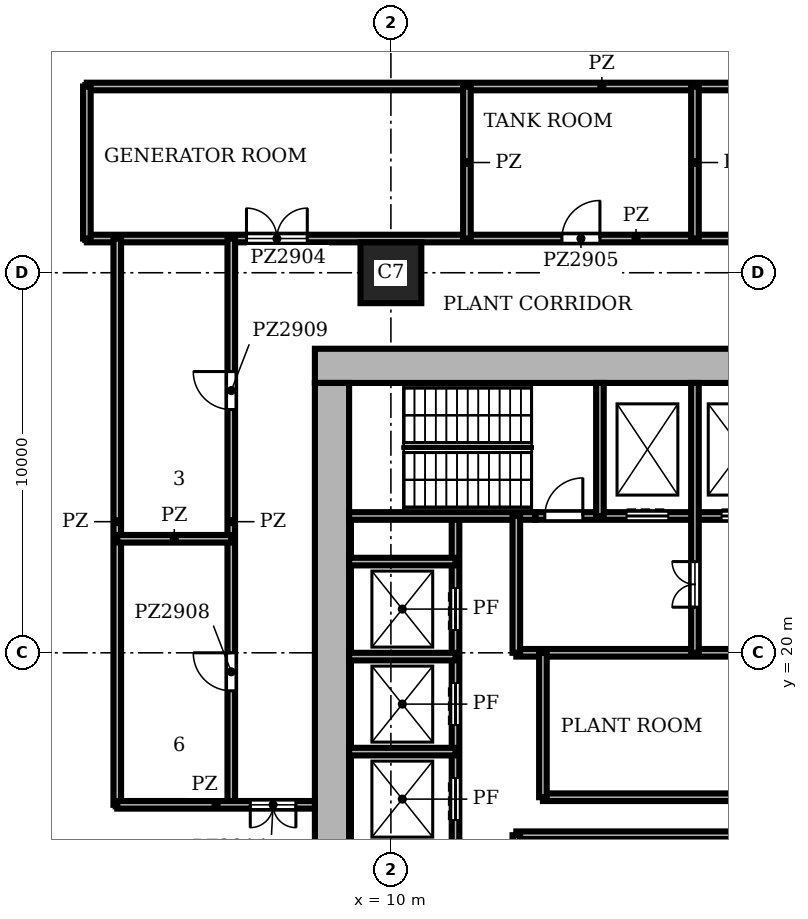
"""IFC4 building model, lengths in metres.
Left out: names, types, materials, properties, quantities, classifications, styles, units other than length and angle.
Written with IfcOpenShell. Run it as: python <this file> out.ifc"""

import sys

from ifc_helpers import new_model, si_unit, direction, frame, frame_2d, origin, origin_2d, place, context, subcontext, project, spatial, rectangle, extrude, element, fill, save


model = new_model("IFC4")
c1 = context("Model", 3, precision=1e-05, world=origin(), true_north=direction((0.0, 1.0)))
c2 = subcontext(c1, "Body", "Model", "MODEL_VIEW")
j1 = project(units=[si_unit("LENGTHUNIT", "METRE"), si_unit("PLANEANGLEUNIT", "RADIAN")], contexts=[c1])
p1 = place(None, origin())
s1 = spatial("IfcSite", under=j1, at=p1, CompositionType="ELEMENT")
p2 = place(p1, origin())
s2 = spatial("IfcBuilding", under=s1, at=p2, CompositionType="ELEMENT")
p3 = place(p2, frame((0.0, 0.0, 117.3)))
s3 = spatial("IfcBuildingStorey", under=s2, at=p3, CompositionType="ELEMENT", Elevation=117.3)
p4 = place(p3, frame((10.0, 30.0, 0.0), z_axis=(0.0, 0.0, 1.0), x_axis=(1.0, 0.0, 0.0)))
e1 = element("IfcColumn", 1, at=p4, inside=s3, PredefinedType="COLUMN", context=c2, shape_type="SweptSolid", body=[
    extrude(rectangle(XDim=1.6, YDim=1.6, at=origin_2d()), origin(), (0.0, 0.0, 1.0), 9.0),
])
p5 = place(p3, frame((28.0, 27.55, 0.0), z_axis=(0.0, 0.0, 1.0), x_axis=(-1.0, 0.0, 0.0)))
e2 = element("IfcWall", 2, at=p5, inside=s3, PredefinedType="SHEAR", context=c2, shape_type="SweptSolid", body=[
    extrude(rectangle(XDim=20.0, YDim=0.9, at=frame_2d((10.0, 0.0))), origin(), (0.0, 0.0, 1.0), 9.0),
])
p6 = place(p3, frame((8.45, 27.1, 0.0), z_axis=(0.0, 0.0, 1.0), x_axis=(0.0, -1.0, 0.0)))
e3 = element("IfcWall", 3, at=p6, inside=s3, PredefinedType="SHEAR", context=c2, shape_type="SweptSolid", body=[
    extrude(rectangle(XDim=18.2, YDim=0.9, at=frame_2d((9.1, 0.0))), origin(), (0.0, 0.0, 1.0), 9.0),
])
p7 = place(p3, frame((13.3, 15.2, 0.0), z_axis=(0.0, 0.0, 1.0), x_axis=(1.0, 0.0, 0.0)))
e4 = element("IfcWall", 4, at=p7, inside=s3, PredefinedType="SHEAR", context=c2, shape_type="SweptSolid", body=[
    extrude(rectangle(XDim=9.7, YDim=0.2, at=frame_2d((4.85, 0.0))), origin(), (0.0, 0.0, 1.0), 8.55),
])
p8 = place(p3, frame((14.0, 16.2, 0.0), z_axis=(0.0, 0.0, 1.0), x_axis=(1.0, 0.0, 0.0)))
e5 = element("IfcWall", 5, at=p8, inside=s3, PredefinedType="SHEAR", context=c2, shape_type="SweptSolid", body=[
    extrude(rectangle(XDim=8.0, YDim=0.2, at=frame_2d((4.0, 0.0))), origin(), (0.0, 0.0, 1.0), 8.55),
])
for number, where, z_axis, x_axis in (
    (6, (8.9, 17.4, 0.0), (0.0, 0.0, 1.0), (1.0, 0.0, 0.0)),
    (7, (8.9, 19.9, 0.0), (0.0, 0.0, 1.0), (1.0, 0.0, 0.0)),
):
    element("IfcWall", number, at=place(p3, frame(where, z_axis=z_axis, x_axis=x_axis)), inside=s3, PredefinedType="SHEAR", context=c2, shape_type="SweptSolid", body=[
        extrude(rectangle(XDim=2.8, YDim=0.2, at=frame_2d((1.4, 0.0))), origin(), (0.0, 0.0, 1.0), 8.55),
    ])
p9 = place(p3, frame((13.3, 20.0, 0.0), z_axis=(0.0, 0.0, 1.0), x_axis=(1.0, 0.0, 0.0)))
e8 = element("IfcWall", 8, at=p9, inside=s3, PredefinedType="SHEAR", context=c2, shape_type="SweptSolid", body=[
    extrude(rectangle(XDim=8.7, YDim=0.2, at=frame_2d((4.35, 0.0))), origin(), (0.0, 0.0, 1.0), 8.55),
])
p10 = place(p3, frame((8.9, 22.4, 0.0), z_axis=(0.0, 0.0, 1.0), x_axis=(1.0, 0.0, 0.0)))
e9 = element("IfcWall", 9, at=p10, inside=s3, PredefinedType="SHEAR", context=c2, shape_type="SweptSolid", body=[
    extrude(rectangle(XDim=2.8, YDim=0.2, at=frame_2d((1.4, 0.0))), origin(), (0.0, 0.0, 1.0), 8.55),
])
p11 = place(p3, frame((8.9, 23.6, 0.0), z_axis=(0.0, 0.0, 1.0), x_axis=(1.0, 0.0, 0.0)))
e10 = element("IfcWall", 10, at=p11, inside=s3, PredefinedType="SHEAR", context=c2, shape_type="SweptSolid", body=[
    extrude(rectangle(XDim=4.9, YDim=0.2, at=frame_2d((2.45, 0.0))), origin(), (0.0, 0.0, 1.0), 8.55),
])
p12 = place(p3, frame((13.8, 23.6, 0.0), z_axis=(0.0, 0.0, 1.0), x_axis=(1.0, 0.0, 0.0)))
e11 = element("IfcWall", 11, at=p12, inside=s3, PredefinedType="SHEAR", context=c2, shape_type="SweptSolid", body=[
    extrude(rectangle(XDim=13.3, YDim=0.2, at=frame_2d((6.65, 0.0))), origin(), (0.0, 0.0, 1.0), 8.55),
])
p13 = place(p12, frame((2.4, 0.0, 0.0)))
e12 = element("IfcOpeningElement", 12, at=p13, cuts=e11, PredefinedType="OPENING", context=c2, shape_type="SweptSolid", body=[
    extrude(rectangle(XDim=1.1, YDim=2.1, at=frame_2d((0.55, 1.05))), frame((0.0, 0.11, 0.0), z_axis=(0.0, -1.0, 0.0), x_axis=(1.0, 0.0, 0.0)), (0.0, 0.0, 1.0), 0.22),
])
p14 = place(p12, frame((4.9, 0.0, 0.0)))
e13 = element("IfcOpeningElement", 13, at=p14, cuts=e11, PredefinedType="OPENING", context=c2, shape_type="SweptSolid", body=[
    extrude(rectangle(XDim=1.1, YDim=2.1, at=frame_2d((0.55, 1.05))), frame((0.0, 0.11, 0.0), z_axis=(0.0, -1.0, 0.0), x_axis=(1.0, 0.0, 0.0)), (0.0, 0.0, 1.0), 0.22),
])
p15 = place(p12, frame((0.25, 0.0, 0.0)))
e14 = element("IfcOpeningElement", 14, at=p15, cuts=e11, PredefinedType="OPENING", context=c2, shape_type="SweptSolid", body=[
    extrude(rectangle(XDim=1.0, YDim=2.1, at=frame_2d((0.5, 1.05))), frame((0.0, 0.11, 0.0), z_axis=(0.0, -1.0, 0.0), x_axis=(1.0, 0.0, 0.0)), (0.0, 0.0, 1.0), 0.22),
])
p16 = place(p3, frame((11.7, 12.4, 0.0), z_axis=(0.0, 0.0, 1.0), x_axis=(0.0, 1.0, 0.0)))
e15 = element("IfcWall", 15, at=p16, inside=s3, PredefinedType="SHEAR", context=c2, shape_type="SweptSolid", body=[
    extrude(rectangle(XDim=11.2, YDim=0.2, at=frame_2d((5.6, 0.0))), origin(), (0.0, 0.0, 1.0), 8.55),
])
p17 = place(p16, frame((0.7, 0.0, 0.0)))
e16 = element("IfcOpeningElement", 16, at=p17, cuts=e15, PredefinedType="OPENING", context=c2, shape_type="SweptSolid", body=[
    extrude(rectangle(XDim=1.1, YDim=2.1, at=frame_2d((0.55, 1.05))), frame((0.0, 0.11, 0.0), z_axis=(0.0, -1.0, 0.0), x_axis=(1.0, 0.0, 0.0)), (0.0, 0.0, 1.0), 0.22),
])
p18 = place(p16, frame((3.2, 0.0, 0.0)))
e17 = element("IfcOpeningElement", 17, at=p18, cuts=e15, PredefinedType="OPENING", context=c2, shape_type="SweptSolid", body=[
    extrude(rectangle(XDim=1.1, YDim=2.1, at=frame_2d((0.55, 1.05))), frame((0.0, 0.11, 0.0), z_axis=(0.0, -1.0, 0.0), x_axis=(1.0, 0.0, 0.0)), (0.0, 0.0, 1.0), 0.22),
])
p19 = place(p16, frame((5.7, 0.0, 0.0)))
e18 = element("IfcOpeningElement", 18, at=p19, cuts=e15, PredefinedType="OPENING", context=c2, shape_type="SweptSolid", body=[
    extrude(rectangle(XDim=1.1, YDim=2.1, at=frame_2d((0.55, 1.05))), frame((0.0, 0.11, 0.0), z_axis=(0.0, -1.0, 0.0), x_axis=(1.0, 0.0, 0.0)), (0.0, 0.0, 1.0), 0.22),
])
p20 = place(p16, frame((8.2, 0.0, 0.0)))
e19 = element("IfcOpeningElement", 19, at=p20, cuts=e15, PredefinedType="OPENING", context=c2, shape_type="SweptSolid", body=[
    extrude(rectangle(XDim=1.1, YDim=2.1, at=frame_2d((0.55, 1.05))), frame((0.0, 0.11, 0.0), z_axis=(0.0, -1.0, 0.0), x_axis=(1.0, 0.0, 0.0)), (0.0, 0.0, 1.0), 0.22),
])
p21 = place(p3, frame((13.3, 12.4, 0.0), z_axis=(0.0, 0.0, 1.0), x_axis=(0.0, 1.0, 0.0)))
e20 = element("IfcWall", 20, at=p21, inside=s3, PredefinedType="SHEAR", context=c2, shape_type="SweptSolid", body=[
    extrude(rectangle(XDim=2.8, YDim=0.2, at=frame_2d((1.4, 0.0))), origin(), (0.0, 0.0, 1.0), 8.55),
])
p22 = place(p3, frame((13.3, 20.0, 0.0), z_axis=(0.0, 0.0, 1.0), x_axis=(0.0, 1.0, 0.0)))
e21 = element("IfcWall", 21, at=p22, inside=s3, PredefinedType="SHEAR", context=c2, shape_type="SweptSolid", body=[
    extrude(rectangle(XDim=3.6, YDim=0.2, at=frame_2d((1.8, 0.0))), origin(), (0.0, 0.0, 1.0), 8.55),
])
p23 = place(p3, frame((14.0, 16.2, 0.0), z_axis=(0.0, 0.0, 1.0), x_axis=(0.0, 1.0, 0.0)))
e22 = element("IfcWall", 22, at=p23, inside=s3, PredefinedType="SHEAR", context=c2, shape_type="SweptSolid", body=[
    extrude(rectangle(XDim=3.8, YDim=0.2, at=frame_2d((1.9, 0.0))), origin(), (0.0, 0.0, 1.0), 8.55),
])
p24 = place(p3, frame((15.5, 23.6, 0.0), z_axis=(0.0, 0.0, 1.0), x_axis=(0.0, 1.0, 0.0)))
e23 = element("IfcWall", 23, at=p24, inside=s3, PredefinedType="SHEAR", context=c2, shape_type="SweptSolid", body=[
    extrude(rectangle(XDim=3.5, YDim=0.2, at=frame_2d((1.75, 0.0))), origin(), (0.0, 0.0, 1.0), 8.55),
])
p25 = place(p3, frame((18.0, 20.0, 0.0), z_axis=(0.0, 0.0, 1.0), x_axis=(0.0, 1.0, 0.0)))
e24 = element("IfcWall", 24, at=p25, inside=s3, PredefinedType="SHEAR", context=c2, shape_type="SweptSolid", body=[
    extrude(rectangle(XDim=7.1, YDim=0.2, at=frame_2d((3.55, 0.0))), origin(), (0.0, 0.0, 1.0), 8.55),
])
p26 = place(p25, frame((1.2, 0.0, 0.0)))
e25 = element("IfcOpeningElement", 25, at=p26, cuts=e24, PredefinedType="OPENING", context=c2, shape_type="SweptSolid", body=[
    extrude(rectangle(XDim=1.2, YDim=2.1, at=frame_2d((0.6, 1.05))), frame((0.0, 0.11, 0.0), z_axis=(0.0, -1.0, 0.0), x_axis=(1.0, 0.0, 0.0)), (0.0, 0.0, 1.0), 0.22),
])
for number, where, z_axis, x_axis in (
    (26, (9.0, 15.1, 7.5), (0.0, 0.0, 1.0), (1.0, 0.0, 0.0)),
    (27, (9.0, 17.2, 7.5), (0.0, 0.0, 1.0), (1.0, 0.0, 0.0)),
):
    element("IfcWall", number, at=place(p3, frame(where, z_axis=z_axis, x_axis=x_axis)), inside=s3, PredefinedType="SOLIDWALL", context=c2, shape_type="SweptSolid", body=[
        extrude(rectangle(XDim=2.6, YDim=0.2, at=frame_2d((1.3, 0.0))), origin(), (0.0, 0.0, 1.0), 1.5),
    ])
for number, where, z_axis, x_axis in (
    (28, (9.1, 15.2, 7.5), (0.0, 0.0, 1.0), (0.0, 1.0, 0.0)),
    (29, (11.5, 15.2, 7.5), (0.0, 0.0, 1.0), (0.0, 1.0, 0.0)),
):
    element("IfcWall", number, at=place(p3, frame(where, z_axis=z_axis, x_axis=x_axis)), inside=s3, PredefinedType="SOLIDWALL", context=c2, shape_type="SweptSolid", body=[
        extrude(rectangle(XDim=1.9, YDim=0.2, at=frame_2d((0.95, 0.0))), origin(), (0.0, 0.0, 1.0), 1.5),
    ])
for number, where, z_axis, x_axis in (
    (30, (9.0, 17.6, 7.5), (0.0, 0.0, 1.0), (1.0, 0.0, 0.0)),
    (31, (9.0, 19.7, 7.5), (0.0, 0.0, 1.0), (1.0, 0.0, 0.0)),
):
    element("IfcWall", number, at=place(p3, frame(where, z_axis=z_axis, x_axis=x_axis)), inside=s3, PredefinedType="SOLIDWALL", context=c2, shape_type="SweptSolid", body=[
        extrude(rectangle(XDim=2.6, YDim=0.2, at=frame_2d((1.3, 0.0))), origin(), (0.0, 0.0, 1.0), 1.5),
    ])
for number, where, z_axis, x_axis in (
    (32, (9.1, 17.7, 7.5), (0.0, 0.0, 1.0), (0.0, 1.0, 0.0)),
    (33, (11.5, 17.7, 7.5), (0.0, 0.0, 1.0), (0.0, 1.0, 0.0)),
):
    element("IfcWall", number, at=place(p3, frame(where, z_axis=z_axis, x_axis=x_axis)), inside=s3, PredefinedType="SOLIDWALL", context=c2, shape_type="SweptSolid", body=[
        extrude(rectangle(XDim=1.9, YDim=0.2, at=frame_2d((0.95, 0.0))), origin(), (0.0, 0.0, 1.0), 1.5),
    ])
for number, where, z_axis, x_axis in (
    (34, (9.0, 20.1, 7.5), (0.0, 0.0, 1.0), (1.0, 0.0, 0.0)),
    (35, (9.0, 22.2, 7.5), (0.0, 0.0, 1.0), (1.0, 0.0, 0.0)),
):
    element("IfcWall", number, at=place(p3, frame(where, z_axis=z_axis, x_axis=x_axis)), inside=s3, PredefinedType="SOLIDWALL", context=c2, shape_type="SweptSolid", body=[
        extrude(rectangle(XDim=2.6, YDim=0.2, at=frame_2d((1.3, 0.0))), origin(), (0.0, 0.0, 1.0), 1.5),
    ])
for number, where, z_axis, x_axis in (
    (36, (9.1, 20.2, 7.5), (0.0, 0.0, 1.0), (0.0, 1.0, 0.0)),
    (37, (11.5, 20.2, 7.5), (0.0, 0.0, 1.0), (0.0, 1.0, 0.0)),
):
    element("IfcWall", number, at=place(p3, frame(where, z_axis=z_axis, x_axis=x_axis)), inside=s3, PredefinedType="SOLIDWALL", context=c2, shape_type="SweptSolid", body=[
        extrude(rectangle(XDim=1.9, YDim=0.2, at=frame_2d((0.95, 0.0))), origin(), (0.0, 0.0, 1.0), 1.5),
    ])
p27 = place(p3, frame((2.0, 30.9, 0.0), z_axis=(0.0, 0.0, 1.0), x_axis=(1.0, 0.0, 0.0)))
e38 = element("IfcWall", 38, at=p27, inside=s3, PredefinedType="PARTITIONING", context=c2, shape_type="SweptSolid", body=[
    extrude(rectangle(XDim=28.9, YDim=0.2, at=frame_2d((14.45, 0.0))), origin(), (0.0, 0.0, 1.0), 8.55),
])
p28 = place(p27, frame((4.2, 0.0, 0.0)))
e39 = element("IfcOpeningElement", 39, at=p28, cuts=e38, PredefinedType="OPENING", context=c2, shape_type="SweptSolid", body=[
    extrude(rectangle(XDim=1.6, YDim=2.1, at=frame_2d((0.8, 1.05))), frame((0.0, 0.11, 0.0), z_axis=(0.0, -1.0, 0.0), x_axis=(1.0, 0.0, 0.0)), (0.0, 0.0, 1.0), 0.22),
])
p29 = place(p27, frame((12.5, 0.0, 0.0)))
e40 = element("IfcOpeningElement", 40, at=p29, cuts=e38, PredefinedType="OPENING", context=c2, shape_type="SweptSolid", body=[
    extrude(rectangle(XDim=1.0, YDim=2.1, at=frame_2d((0.5, 1.05))), frame((0.0, 0.11, 0.0), z_axis=(0.0, -1.0, 0.0), x_axis=(1.0, 0.0, 0.0)), (0.0, 0.0, 1.0), 0.22),
])
p30 = place(p27, frame((19.8, 0.0, 0.0)))
e41 = element("IfcOpeningElement", 41, at=p30, cuts=e38, PredefinedType="OPENING", context=c2, shape_type="SweptSolid", body=[
    extrude(rectangle(XDim=1.6, YDim=2.1, at=frame_2d((0.8, 1.05))), frame((0.0, 0.11, 0.0), z_axis=(0.0, -1.0, 0.0), x_axis=(1.0, 0.0, 0.0)), (0.0, 0.0, 1.0), 0.22),
])
p31 = place(p27, frame((23.8, 0.0, 0.0)))
e42 = element("IfcOpeningElement", 42, at=p31, cuts=e38, PredefinedType="OPENING", context=c2, shape_type="SweptSolid", body=[
    extrude(rectangle(XDim=1.6, YDim=2.1, at=frame_2d((0.8, 1.05))), frame((0.0, 0.11, 0.0), z_axis=(0.0, -1.0, 0.0), x_axis=(1.0, 0.0, 0.0)), (0.0, 0.0, 1.0), 0.22),
])
p32 = place(p3, frame((2.0, 34.9, 0.0), z_axis=(0.0, 0.0, 1.0), x_axis=(1.0, 0.0, 0.0)))
e43 = element("IfcWall", 43, at=p32, inside=s3, PredefinedType="PARTITIONING", context=c2, shape_type="SweptSolid", body=[
    extrude(rectangle(XDim=27.1, YDim=0.2, at=frame_2d((13.55, 0.0))), origin(), (0.0, 0.0, 1.0), 8.55),
])
p33 = place(p3, frame((2.8, 16.0, 0.0), z_axis=(0.0, 0.0, 1.0), x_axis=(1.0, 0.0, 0.0)))
e44 = element("IfcWall", 44, at=p33, inside=s3, PredefinedType="PARTITIONING", context=c2, shape_type="SweptSolid", body=[
    extrude(rectangle(XDim=5.2, YDim=0.2, at=frame_2d((2.6, 0.0))), origin(), (0.0, 0.0, 1.0), 8.55),
])
p34 = place(p33, frame((3.5, 0.0, 0.0)))
e45 = element("IfcOpeningElement", 45, at=p34, cuts=e44, PredefinedType="OPENING", context=c2, shape_type="SweptSolid", body=[
    extrude(rectangle(XDim=1.2, YDim=2.1, at=frame_2d((0.6, 1.05))), frame((0.0, 0.11, 0.0), z_axis=(0.0, -1.0, 0.0), x_axis=(1.0, 0.0, 0.0)), (0.0, 0.0, 1.0), 0.22),
])
p35 = place(p3, frame((2.8, 23.0, 0.0), z_axis=(0.0, 0.0, 1.0), x_axis=(1.0, 0.0, 0.0)))
e46 = element("IfcWall", 46, at=p35, inside=s3, PredefinedType="PARTITIONING", context=c2, shape_type="SweptSolid", body=[
    extrude(rectangle(XDim=3.0, YDim=0.2, at=frame_2d((1.5, 0.0))), origin(), (0.0, 0.0, 1.0), 8.55),
])
p36 = place(p3, frame((2.0, 30.9, 0.0), z_axis=(0.0, 0.0, 1.0), x_axis=(0.0, 1.0, 0.0)))
e47 = element("IfcWall", 47, at=p36, inside=s3, PredefinedType="PARTITIONING", context=c2, shape_type="SweptSolid", body=[
    extrude(rectangle(XDim=4.0, YDim=0.2, at=frame_2d((2.0, 0.0))), origin(), (0.0, 0.0, 1.0), 8.55),
])
p37 = place(p3, frame((2.8, 16.0, 0.0), z_axis=(0.0, 0.0, 1.0), x_axis=(0.0, 1.0, 0.0)))
e48 = element("IfcWall", 48, at=p37, inside=s3, PredefinedType="PARTITIONING", context=c2, shape_type="SweptSolid", body=[
    extrude(rectangle(XDim=14.9, YDim=0.2, at=frame_2d((7.45, 0.0))), origin(), (0.0, 0.0, 1.0), 8.55),
])
p38 = place(p3, frame((5.8, 16.0, 0.0), z_axis=(0.0, 0.0, 1.0), x_axis=(0.0, 1.0, 0.0)))
e49 = element("IfcWall", 49, at=p38, inside=s3, PredefinedType="PARTITIONING", context=c2, shape_type="SweptSolid", body=[
    extrude(rectangle(XDim=14.9, YDim=0.2, at=frame_2d((7.45, 0.0))), origin(), (0.0, 0.0, 1.0), 8.55),
])
p39 = place(p38, frame((3.0, 0.0, 0.0)))
e50 = element("IfcOpeningElement", 50, at=p39, cuts=e49, PredefinedType="OPENING", context=c2, shape_type="SweptSolid", body=[
    extrude(rectangle(XDim=1.0, YDim=2.1, at=frame_2d((0.5, 1.05))), frame((0.0, 0.11, 0.0), z_axis=(0.0, -1.0, 0.0), x_axis=(1.0, 0.0, 0.0)), (0.0, 0.0, 1.0), 0.22),
])
p40 = place(p38, frame((10.4, 0.0, 0.0)))
e51 = element("IfcOpeningElement", 51, at=p40, cuts=e49, PredefinedType="OPENING", context=c2, shape_type="SweptSolid", body=[
    extrude(rectangle(XDim=1.0, YDim=2.1, at=frame_2d((0.5, 1.05))), frame((0.0, 0.11, 0.0), z_axis=(0.0, -1.0, 0.0), x_axis=(1.0, 0.0, 0.0)), (0.0, 0.0, 1.0), 0.22),
])
for number, where, z_axis, x_axis in (
    (52, (12.0, 30.9, 0.0), (0.0, 0.0, 1.0), (0.0, 1.0, 0.0)),
    (53, (18.0, 30.9, 0.0), (0.0, 0.0, 1.0), (0.0, 1.0, 0.0)),
):
    element("IfcWall", number, at=place(p3, frame(where, z_axis=z_axis, x_axis=x_axis)), inside=s3, PredefinedType="PARTITIONING", context=c2, shape_type="SweptSolid", body=[
        extrude(rectangle(XDim=4.0, YDim=0.2, at=frame_2d((2.0, 0.0))), origin(), (0.0, 0.0, 1.0), 8.55),
    ])
p41 = place(p18, origin())
e54 = element("IfcDoor", 54, at=p41, inside=s3, OperationType="DOUBLE_DOOR_SLIDING", PredefinedType="DOOR", context=c2, shape_type="SweptSolid", body=[
    extrude(rectangle(XDim=1.1, YDim=2.1, at=frame_2d((0.55, 1.05))), frame((0.0, 0.025, 0.0), z_axis=(0.0, -1.0, 0.0), x_axis=(1.0, 0.0, 0.0)), (0.0, 0.0, 1.0), 0.05),
])
fill(e17, e54)
p42 = place(p19, origin())
e55 = element("IfcDoor", 55, at=p42, inside=s3, OperationType="DOUBLE_DOOR_SLIDING", PredefinedType="DOOR", context=c2, shape_type="SweptSolid", body=[
    extrude(rectangle(XDim=1.1, YDim=2.1, at=frame_2d((0.55, 1.05))), frame((0.0, 0.025, 0.0), z_axis=(0.0, -1.0, 0.0), x_axis=(1.0, 0.0, 0.0)), (0.0, 0.0, 1.0), 0.05),
])
fill(e18, e55)
p43 = place(p20, origin())
e56 = element("IfcDoor", 56, at=p43, inside=s3, OperationType="DOUBLE_DOOR_SLIDING", PredefinedType="DOOR", context=c2, shape_type="SweptSolid", body=[
    extrude(rectangle(XDim=1.1, YDim=2.1, at=frame_2d((0.55, 1.05))), frame((0.0, 0.025, 0.0), z_axis=(0.0, -1.0, 0.0), x_axis=(1.0, 0.0, 0.0)), (0.0, 0.0, 1.0), 0.05),
])
fill(e19, e56)
p44 = place(p13, origin())
e57 = element("IfcDoor", 57, at=p44, inside=s3, OperationType="DOUBLE_DOOR_SLIDING", PredefinedType="DOOR", context=c2, shape_type="SweptSolid", body=[
    extrude(rectangle(XDim=1.1, YDim=2.1, at=frame_2d((0.55, 1.05))), frame((0.0, 0.025, 0.0), z_axis=(0.0, -1.0, 0.0), x_axis=(1.0, 0.0, 0.0)), (0.0, 0.0, 1.0), 0.05),
])
fill(e12, e57)
p45 = place(p14, origin())
e58 = element("IfcDoor", 58, at=p45, inside=s3, OperationType="DOUBLE_DOOR_SLIDING", PredefinedType="DOOR", context=c2, shape_type="SweptSolid", body=[
    extrude(rectangle(XDim=1.1, YDim=2.1, at=frame_2d((0.55, 1.05))), frame((0.0, 0.025, 0.0), z_axis=(0.0, -1.0, 0.0), x_axis=(1.0, 0.0, 0.0)), (0.0, 0.0, 1.0), 0.05),
])
fill(e13, e58)
p46 = place(p15, origin())
e59 = element("IfcDoor", 59, at=p46, inside=s3, OperationType="SINGLE_SWING_RIGHT", PredefinedType="DOOR", context=c2, shape_type="SweptSolid", body=[
    extrude(rectangle(XDim=1.0, YDim=2.1, at=frame_2d((0.5, 1.05))), frame((0.0, 0.025, 0.0), z_axis=(0.0, -1.0, 0.0), x_axis=(1.0, 0.0, 0.0)), (0.0, 0.0, 1.0), 0.05),
])
fill(e14, e59)
p47 = place(p26, origin())
e60 = element("IfcDoor", 60, at=p47, inside=s3, OperationType="DOUBLE_DOOR_SINGLE_SWING", PredefinedType="DOOR", context=c2, shape_type="SweptSolid", body=[
    extrude(rectangle(XDim=1.2, YDim=2.1, at=frame_2d((0.6, 1.05))), frame((0.0, 0.025, 0.0), z_axis=(0.0, -1.0, 0.0), x_axis=(1.0, 0.0, 0.0)), (0.0, 0.0, 1.0), 0.05),
])
fill(e25, e60)
p48 = place(p28, origin())
e61 = element("IfcDoor", 61, at=p48, inside=s3, OperationType="DOUBLE_DOOR_DOUBLE_SWING", PredefinedType="DOOR", context=c2, shape_type="SweptSolid", body=[
    extrude(rectangle(XDim=1.6, YDim=2.1, at=frame_2d((0.8, 1.05))), frame((0.0, 0.025, 0.0), z_axis=(0.0, -1.0, 0.0), x_axis=(1.0, 0.0, 0.0)), (0.0, 0.0, 1.0), 0.05),
])
fill(e39, e61)
p49 = place(p29, origin())
e62 = element("IfcDoor", 62, at=p49, inside=s3, OperationType="SINGLE_SWING_RIGHT", PredefinedType="DOOR", context=c2, shape_type="SweptSolid", body=[
    extrude(rectangle(XDim=1.0, YDim=2.1, at=frame_2d((0.5, 1.05))), frame((0.0, 0.025, 0.0), z_axis=(0.0, -1.0, 0.0), x_axis=(1.0, 0.0, 0.0)), (0.0, 0.0, 1.0), 0.05),
])
fill(e40, e62)
p50 = place(p39, origin())
e63 = element("IfcDoor", 63, at=p50, inside=s3, OperationType="SINGLE_SWING_RIGHT", PredefinedType="DOOR", context=c2, shape_type="SweptSolid", body=[
    extrude(rectangle(XDim=1.0, YDim=2.1, at=frame_2d((0.5, 1.05))), frame((0.0, 0.025, 0.0), z_axis=(0.0, -1.0, 0.0), x_axis=(1.0, 0.0, 0.0)), (0.0, 0.0, 1.0), 0.05),
])
fill(e50, e63)
p51 = place(p40, origin())
e64 = element("IfcDoor", 64, at=p51, inside=s3, OperationType="SINGLE_SWING_RIGHT", PredefinedType="DOOR", context=c2, shape_type="SweptSolid", body=[
    extrude(rectangle(XDim=1.0, YDim=2.1, at=frame_2d((0.5, 1.05))), frame((0.0, 0.025, 0.0), z_axis=(0.0, -1.0, 0.0), x_axis=(1.0, 0.0, 0.0)), (0.0, 0.0, 1.0), 0.05),
])
fill(e51, e64)
p52 = place(p34, frame((1.2, 0.0, 0.0), z_axis=(0.0, 0.0, 1.0), x_axis=(-1.0, 0.0, 0.0)))
e65 = element("IfcDoor", 65, at=p52, inside=s3, OperationType="DOUBLE_DOOR_SINGLE_SWING", PredefinedType="DOOR", context=c2, shape_type="SweptSolid", body=[
    extrude(rectangle(XDim=1.2, YDim=2.1, at=frame_2d((0.6, 1.05))), frame((0.0, 0.025, 0.0), z_axis=(0.0, -1.0, 0.0), x_axis=(1.0, 0.0, 0.0)), (0.0, 0.0, 1.0), 0.05),
])
fill(e45, e65)
save(model, sys.argv[1])
